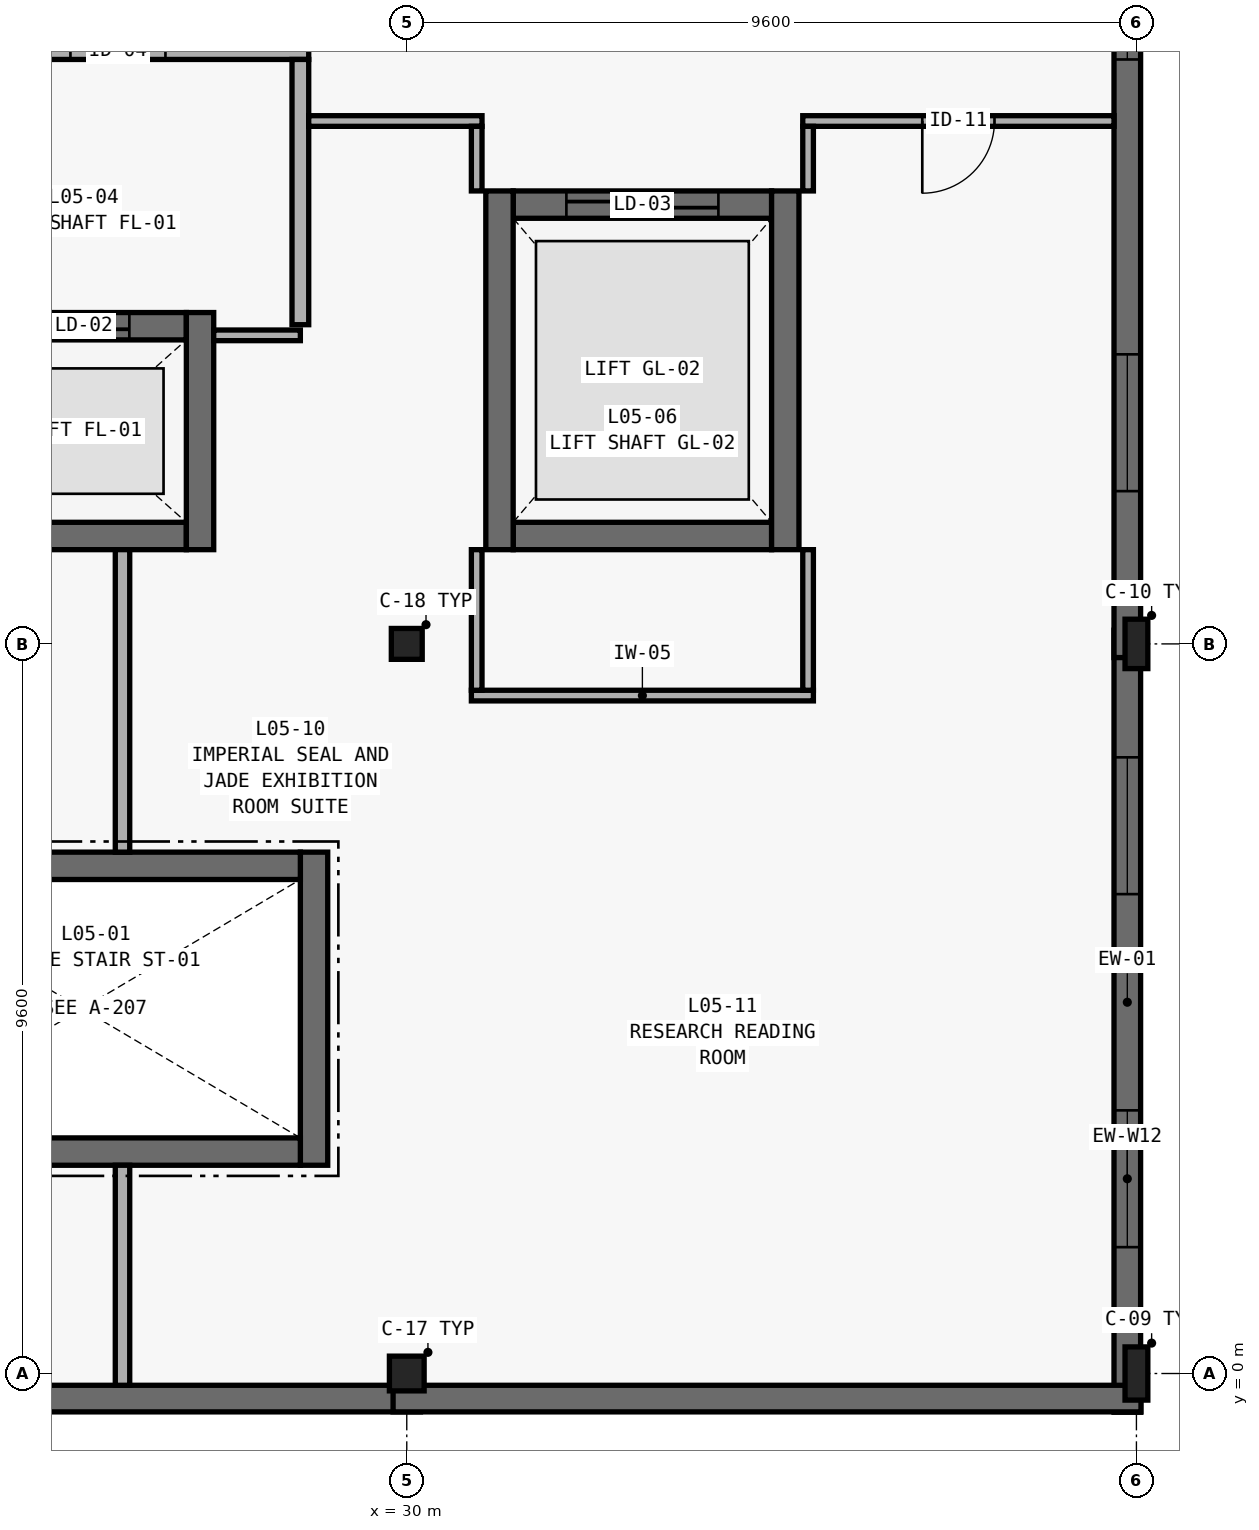
"""IFC4 building model, lengths in metres.
Left out: names, types, materials, properties, quantities, classifications, styles, units other than length and angle.
Written with IfcOpenShell. Run it as: python <this file> out.ifc"""

import sys

from ifc_helpers import new_model, si_unit, direction, frame, frame_2d, origin, origin_2d, place, context, subcontext, project, spatial, rectangle, hollow_circle, i_section, extrude, element, fill, save


model = new_model("IFC4")
c1 = context("Model", 3, precision=1e-05, world=origin(), true_north=direction((0.0, 1.0)))
c2 = subcontext(c1, "Body", "Model", "MODEL_VIEW")
j1 = project(units=[si_unit("LENGTHUNIT", "METRE"), si_unit("PLANEANGLEUNIT", "RADIAN")], contexts=[c1])
p1 = place(None, origin())
s1 = spatial("IfcSite", under=j1, at=p1, CompositionType="ELEMENT")
p2 = place(p1, origin())
s2 = spatial("IfcBuilding", under=s1, at=p2, CompositionType="ELEMENT")
p3 = place(p2, frame((0.0, 0.0, 25.5)))
s3 = spatial("IfcBuildingStorey", under=s2, at=p3, CompositionType="ELEMENT", Elevation=25.5)
p4 = place(p3, frame((30.0, 0.0, 0.0), z_axis=(0.0, 0.0, 1.0), x_axis=(1.0, 0.0, 0.0)))
e1 = element("IfcColumn", 1, at=p4, inside=s3, PredefinedType="COLUMN", context=c2, shape_type="SweptSolid", body=[
    extrude(hollow_circle(Radius=0.229, WallThickness=0.02, at=origin_2d()), origin(), (0.0, 0.0, 1.0), 4.2),
])
p5 = place(p3, frame((30.0, 9.6, 0.0), z_axis=(0.0, 0.0, 1.0), x_axis=(1.0, 0.0, 0.0)))
e2 = element("IfcColumn", 2, at=p5, inside=s3, PredefinedType="COLUMN", context=c2, shape_type="SweptSolid", body=[
    extrude(hollow_circle(Radius=0.203, WallThickness=0.02, at=origin_2d()), origin(), (0.0, 0.0, 1.0), 4.2),
])
p6 = place(p3, frame((39.6, 0.0, 0.0), z_axis=(0.0, 0.0, 1.0), x_axis=(1.0, 0.0, 0.0)))
e3 = element("IfcColumn", 3, at=p6, inside=s3, PredefinedType="COLUMN", context=c2, shape_type="SweptSolid", body=[
    extrude(i_section(OverallWidth=0.3, OverallDepth=0.7, WebThickness=0.017, FlangeThickness=0.032, FilletRadius=0.027, at=origin_2d()), origin(), (0.0, 0.0, 1.0), 4.2),
])
p7 = place(p3, frame((39.6, 9.6, 0.0), z_axis=(0.0, 0.0, 1.0), x_axis=(1.0, 0.0, 0.0)))
e4 = element("IfcColumn", 4, at=p7, inside=s3, PredefinedType="COLUMN", context=c2, shape_type="SweptSolid", body=[
    extrude(i_section(OverallWidth=0.3, OverallDepth=0.65, WebThickness=0.016, FlangeThickness=0.031, FilletRadius=0.027, at=origin_2d()), origin(), (0.0, 0.0, 1.0), 4.2),
])
p8 = place(p3, frame((39.48, -0.51, 0.0), z_axis=(0.0, 0.0, 1.0), x_axis=(0.0, 1.0, 0.0)))
e5 = element("IfcWall", 5, at=p8, inside=s3, PredefinedType="STANDARD", context=c2, shape_type="SweptSolid", body=[
    extrude(rectangle(XDim=10.29, YDim=0.35, at=frame_2d((5.145, 0.0))), origin(), (0.0, 0.0, 1.0), 3.9),
])
p9 = place(p8, frame((2.173, 0.0, 1.8)))
e6 = element("IfcOpeningElement", 6, at=p9, cuts=e5, PredefinedType="OPENING", context=c2, shape_type="SweptSolid", body=[
    extrude(rectangle(XDim=1.8, YDim=1.1, at=frame_2d((0.9, 0.55))), frame((0.0, 0.19, 0.0), z_axis=(0.0, -1.0, 0.0), x_axis=(1.0, 0.0, 0.0)), (0.0, 0.0, 1.0), 0.38),
])
p10 = place(p8, frame((6.817, 0.0, 1.8)))
e7 = element("IfcOpeningElement", 7, at=p10, cuts=e5, PredefinedType="OPENING", context=c2, shape_type="SweptSolid", body=[
    extrude(rectangle(XDim=1.8, YDim=1.1, at=frame_2d((0.9, 0.55))), frame((0.0, 0.19, 0.0), z_axis=(0.0, -1.0, 0.0), x_axis=(1.0, 0.0, 0.0)), (0.0, 0.0, 1.0), 0.38),
])
p11 = place(p3, frame((39.48, 9.42, 0.0), z_axis=(0.0, 0.0, 1.0), x_axis=(0.0, 1.0, 0.0)))
e8 = element("IfcWall", 8, at=p11, inside=s3, PredefinedType="STANDARD", context=c2, shape_type="SweptSolid", body=[
    extrude(rectangle(XDim=12.36, YDim=0.35, at=frame_2d((6.18, 0.0))), origin(), (0.0, 0.0, 1.0), 3.9),
])
p12 = place(p11, frame((2.19, 0.0, 1.8)))
e9 = element("IfcOpeningElement", 9, at=p12, cuts=e8, PredefinedType="OPENING", context=c2, shape_type="SweptSolid", body=[
    extrude(rectangle(XDim=1.8, YDim=1.1, at=frame_2d((0.9, 0.55))), frame((0.0, 0.19, 0.0), z_axis=(0.0, -1.0, 0.0), x_axis=(1.0, 0.0, 0.0)), (0.0, 0.0, 1.0), 0.38),
])
p13 = place(p11, frame((7.87, 0.0, 1.8)))
e10 = element("IfcOpeningElement", 10, at=p13, cuts=e8, PredefinedType="OPENING", context=c2, shape_type="SweptSolid", body=[
    extrude(rectangle(XDim=1.8, YDim=1.1, at=frame_2d((0.9, 0.55))), frame((0.0, 0.19, 0.0), z_axis=(0.0, -1.0, 0.0), x_axis=(1.0, 0.0, 0.0)), (0.0, 0.0, 1.0), 0.38),
])
p14 = place(p3, frame((20.22, -0.33, 0.0), z_axis=(0.0, 0.0, 1.0), x_axis=(1.0, 0.0, 0.0)))
e11 = element("IfcWall", 11, at=p14, inside=s3, PredefinedType="STANDARD", context=c2, shape_type="SweptSolid", body=[
    extrude(rectangle(XDim=9.96, YDim=0.35, at=frame_2d((4.98, 0.0))), origin(), (0.0, 0.0, 1.0), 3.9),
])
p15 = place(p3, frame((29.82, -0.33, 0.0), z_axis=(0.0, 0.0, 1.0), x_axis=(1.0, 0.0, 0.0)))
e12 = element("IfcWall", 12, at=p15, inside=s3, PredefinedType="STANDARD", context=c2, shape_type="SweptSolid", body=[
    extrude(rectangle(XDim=9.84, YDim=0.35, at=frame_2d((4.92, 0.0))), origin(), (0.0, 0.0, 1.0), 3.9),
])
p16 = place(p3, frame((28.78, 2.74, 0.0), z_axis=(0.0, 0.0, 1.0), x_axis=(0.0, 1.0, 0.0)))
e13 = element("IfcWall", 13, at=p16, inside=s3, PredefinedType="SHEAR", context=c2, shape_type="SweptSolid", body=[
    extrude(rectangle(XDim=4.12, YDim=0.36, at=frame_2d((2.06, 0.0))), origin(), (0.0, 0.0, 1.0), 3.96),
])
for number, where, z_axis, x_axis in (
    (14, (21.2, 6.68, 0.0), (0.0, 0.0, 1.0), (1.0, 0.0, 0.0)),
    (15, (21.2, 2.92, 0.0), (0.0, 0.0, 1.0), (1.0, 0.0, 0.0)),
):
    element("IfcWall", number, at=place(p3, frame(where, z_axis=z_axis, x_axis=x_axis)), inside=s3, PredefinedType="SHEAR", context=c2, shape_type="SweptSolid", body=[
        extrude(rectangle(XDim=7.4, YDim=0.36, at=frame_2d((3.7, 0.0))), origin(), (0.0, 0.0, 1.0), 3.96),
    ])
p17 = place(p3, frame((24.4, 13.78, 0.0), z_axis=(0.0, 0.0, 1.0), x_axis=(1.0, 0.0, 0.0)))
e16 = element("IfcWall", 16, at=p17, inside=s3, PredefinedType="SHEAR", context=c2, shape_type="SweptSolid", body=[
    extrude(rectangle(XDim=2.7, YDim=0.36, at=frame_2d((1.35, 0.0))), origin(), (0.0, 0.0, 1.0), 3.96),
])
p18 = place(p17, frame((0.75, 0.0, 0.0)))
e17 = element("IfcOpeningElement", 17, at=p18, cuts=e16, PredefinedType="OPENING", context=c2, shape_type="SweptSolid", body=[
    extrude(rectangle(XDim=1.2, YDim=2.15, at=frame_2d((0.6, 1.075))), frame((0.0, 0.195, 0.0), z_axis=(0.0, -1.0, 0.0), x_axis=(1.0, 0.0, 0.0)), (0.0, 0.0, 1.0), 0.39),
])
p19 = place(p3, frame((24.4, 11.02, 0.0), z_axis=(0.0, 0.0, 1.0), x_axis=(1.0, 0.0, 0.0)))
e18 = element("IfcWall", 18, at=p19, inside=s3, PredefinedType="SHEAR", context=c2, shape_type="SweptSolid", body=[
    extrude(rectangle(XDim=2.7, YDim=0.36, at=frame_2d((1.35, 0.0))), origin(), (0.0, 0.0, 1.0), 3.96),
])
p20 = place(p3, frame((27.28, 10.84, 0.0), z_axis=(0.0, 0.0, 1.0), x_axis=(0.0, 1.0, 0.0)))
e19 = element("IfcWall", 19, at=p20, inside=s3, PredefinedType="SHEAR", context=c2, shape_type="SweptSolid", body=[
    extrude(rectangle(XDim=3.12, YDim=0.36, at=frame_2d((1.56, 0.0))), origin(), (0.0, 0.0, 1.0), 3.96),
])
p21 = place(p3, frame((23.69, 17.4, 0.0), z_axis=(0.0, 0.0, 1.0), x_axis=(1.0, 0.0, 0.0)))
e20 = element("IfcWall", 20, at=p21, inside=s3, PredefinedType="PARTITIONING", context=c2, shape_type="SweptSolid", body=[
    extrude(rectangle(XDim=5.02, YDim=0.22, at=frame_2d((2.51, 0.0))), origin(), (0.0, 0.0, 1.0), 2.84),
])
p22 = place(p21, frame((1.885, 0.0, 0.0)))
e21 = element("IfcOpeningElement", 21, at=p22, cuts=e20, PredefinedType="OPENING", context=c2, shape_type="SweptSolid", body=[
    extrude(rectangle(XDim=1.25, YDim=2.15, at=frame_2d((0.625, 1.075))), frame((0.0, 0.125, 0.0), z_axis=(0.0, -1.0, 0.0), x_axis=(1.0, 0.0, 0.0)), (0.0, 0.0, 1.0), 0.25),
])
p23 = place(p3, frame((28.6, 13.8, 0.0), z_axis=(0.0, 0.0, 1.0), x_axis=(0.0, 1.0, 0.0)))
e22 = element("IfcWall", 22, at=p23, inside=s3, PredefinedType="PARTITIONING", context=c2, shape_type="SweptSolid", body=[
    extrude(rectangle(XDim=3.49, YDim=0.22, at=frame_2d((1.745, 0.0))), origin(), (0.0, 0.0, 1.0), 2.84),
])
p24 = place(p3, frame((31.4, 15.38, 0.0), z_axis=(0.0, 0.0, 1.0), x_axis=(1.0, 0.0, 0.0)))
e23 = element("IfcWall", 23, at=p24, inside=s3, PredefinedType="SHEAR", context=c2, shape_type="SweptSolid", body=[
    extrude(rectangle(XDim=3.4, YDim=0.36, at=frame_2d((1.7, 0.0))), origin(), (0.0, 0.0, 1.0), 3.96),
])
p25 = place(p24, frame((0.7, 0.0, 0.0)))
e24 = element("IfcOpeningElement", 24, at=p25, cuts=e23, PredefinedType="OPENING", context=c2, shape_type="SweptSolid", body=[
    extrude(rectangle(XDim=2.0, YDim=2.4, at=frame_2d((1.0, 1.2))), frame((0.0, 0.195, 0.0), z_axis=(0.0, -1.0, 0.0), x_axis=(1.0, 0.0, 0.0)), (0.0, 0.0, 1.0), 0.39),
])
p26 = place(p3, frame((31.4, 11.02, 0.0), z_axis=(0.0, 0.0, 1.0), x_axis=(1.0, 0.0, 0.0)))
e25 = element("IfcWall", 25, at=p26, inside=s3, PredefinedType="SHEAR", context=c2, shape_type="SweptSolid", body=[
    extrude(rectangle(XDim=3.4, YDim=0.36, at=frame_2d((1.7, 0.0))), origin(), (0.0, 0.0, 1.0), 3.96),
])
for number, where, z_axis, x_axis in (
    (26, (31.22, 10.84, 0.0), (0.0, 0.0, 1.0), (0.0, 1.0, 0.0)),
    (27, (34.98, 10.84, 0.0), (0.0, 0.0, 1.0), (0.0, 1.0, 0.0)),
):
    element("IfcWall", number, at=place(p3, frame(where, z_axis=z_axis, x_axis=x_axis)), inside=s3, PredefinedType="SHEAR", context=c2, shape_type="SweptSolid", body=[
        extrude(rectangle(XDim=4.72, YDim=0.36, at=frame_2d((2.36, 0.0))), origin(), (0.0, 0.0, 1.0), 3.96),
    ])
p27 = place(p3, frame((30.85, 8.92, 0.0), z_axis=(0.0, 0.0, 1.0), x_axis=(1.0, 0.0, 0.0)))
e28 = element("IfcWall", 28, at=p27, inside=s3, PredefinedType="PARTITIONING", context=c2, shape_type="SweptSolid", body=[
    extrude(rectangle(XDim=4.5, YDim=0.14, at=frame_2d((2.25, 0.0))), origin(), (0.0, 0.0, 1.0), 2.84),
])
p28 = place(p3, frame((27.46, 13.66, 0.0), z_axis=(0.0, 0.0, 1.0), x_axis=(1.0, 0.0, 0.0)))
e29 = element("IfcWall", 29, at=p28, inside=s3, PredefinedType="PARTITIONING", context=c2, shape_type="SweptSolid", body=[
    extrude(rectangle(XDim=1.14, YDim=0.14, at=frame_2d((0.57, 0.0))), origin(), (0.0, 0.0, 1.0), 2.84),
])
p29 = place(p3, frame((28.71, 16.48, 0.0), z_axis=(0.0, 0.0, 1.0), x_axis=(1.0, 0.0, 0.0)))
e30 = element("IfcWall", 30, at=p29, inside=s3, PredefinedType="PARTITIONING", context=c2, shape_type="SweptSolid", body=[
    extrude(rectangle(XDim=2.28, YDim=0.14, at=frame_2d((1.14, 0.0))), origin(), (0.0, 0.0, 1.0), 2.84),
])
p30 = place(p3, frame((35.21, 16.48, 0.0), z_axis=(0.0, 0.0, 1.0), x_axis=(1.0, 0.0, 0.0)))
e31 = element("IfcWall", 31, at=p30, inside=s3, PredefinedType="PARTITIONING", context=c2, shape_type="SweptSolid", body=[
    extrude(rectangle(XDim=4.095, YDim=0.14, at=frame_2d((2.047, 0.0))), origin(), (0.0, 0.0, 1.0), 2.84),
])
p31 = place(p30, frame((1.573, 0.0, 0.0)))
e32 = element("IfcOpeningElement", 32, at=p31, cuts=e31, PredefinedType="OPENING", context=c2, shape_type="SweptSolid", body=[
    extrude(rectangle(XDim=0.95, YDim=2.15, at=frame_2d((0.475, 1.075))), frame((0.0, 0.085, 0.0), z_axis=(0.0, -1.0, 0.0), x_axis=(1.0, 0.0, 0.0)), (0.0, 0.0, 1.0), 0.17),
])
p32 = place(p3, frame((26.26, -0.155, 0.0), z_axis=(0.0, 0.0, 1.0), x_axis=(0.0, 1.0, 0.0)))
e33 = element("IfcWall", 33, at=p32, inside=s3, PredefinedType="PARTITIONING", context=c2, shape_type="SweptSolid", body=[
    extrude(rectangle(XDim=2.895, YDim=0.19, at=frame_2d((1.448, 0.0))), origin(), (0.0, 0.0, 1.0), 2.84),
])
p33 = place(p3, frame((26.26, 6.86, 0.0), z_axis=(0.0, 0.0, 1.0), x_axis=(0.0, 1.0, 0.0)))
e34 = element("IfcWall", 34, at=p33, inside=s3, PredefinedType="PARTITIONING", context=c2, shape_type="SweptSolid", body=[
    extrude(rectangle(XDim=3.98, YDim=0.19, at=frame_2d((1.99, 0.0))), origin(), (0.0, 0.0, 1.0), 2.84),
])
p34 = place(p3, frame((30.92, 8.99, 0.0), z_axis=(0.0, 0.0, 1.0), x_axis=(0.0, 1.0, 0.0)))
e35 = element("IfcWall", 35, at=p34, inside=s3, PredefinedType="PARTITIONING", context=c2, shape_type="SweptSolid", body=[
    extrude(rectangle(XDim=1.85, YDim=0.14, at=frame_2d((0.925, 0.0))), origin(), (0.0, 0.0, 1.0), 2.84),
])
p35 = place(p3, frame((30.92, 15.56, 0.0), z_axis=(0.0, 0.0, 1.0), x_axis=(0.0, 1.0, 0.0)))
e36 = element("IfcWall", 36, at=p35, inside=s3, PredefinedType="PARTITIONING", context=c2, shape_type="SweptSolid", body=[
    extrude(rectangle(XDim=0.85, YDim=0.14, at=frame_2d((0.425, 0.0))), origin(), (0.0, 0.0, 1.0), 2.84),
])
p36 = place(p3, frame((35.28, 8.99, 0.0), z_axis=(0.0, 0.0, 1.0), x_axis=(0.0, 1.0, 0.0)))
e37 = element("IfcWall", 37, at=p36, inside=s3, PredefinedType="PARTITIONING", context=c2, shape_type="SweptSolid", body=[
    extrude(rectangle(XDim=1.85, YDim=0.14, at=frame_2d((0.925, 0.0))), origin(), (0.0, 0.0, 1.0), 2.84),
])
p37 = place(p3, frame((35.28, 15.56, 0.0), z_axis=(0.0, 0.0, 1.0), x_axis=(0.0, 1.0, 0.0)))
e38 = element("IfcWall", 38, at=p37, inside=s3, PredefinedType="PARTITIONING", context=c2, shape_type="SweptSolid", body=[
    extrude(rectangle(XDim=0.85, YDim=0.14, at=frame_2d((0.425, 0.0))), origin(), (0.0, 0.0, 1.0), 2.84),
])
p38 = place(p9, origin())
e39 = element("IfcWindow", 39, at=p38, inside=s3, PartitioningType="SINGLE_PANEL", PredefinedType="WINDOW", context=c2, shape_type="SweptSolid", body=[
    extrude(rectangle(XDim=1.8, YDim=1.1, at=frame_2d((0.9, 0.55))), frame((0.0, 0.03, 0.0), z_axis=(0.0, -1.0, 0.0), x_axis=(1.0, 0.0, 0.0)), (0.0, 0.0, 1.0), 0.06),
])
fill(e6, e39)
p39 = place(p10, origin())
e40 = element("IfcWindow", 40, at=p39, inside=s3, PartitioningType="SINGLE_PANEL", PredefinedType="WINDOW", context=c2, shape_type="SweptSolid", body=[
    extrude(rectangle(XDim=1.8, YDim=1.1, at=frame_2d((0.9, 0.55))), frame((0.0, 0.03, 0.0), z_axis=(0.0, -1.0, 0.0), x_axis=(1.0, 0.0, 0.0)), (0.0, 0.0, 1.0), 0.06),
])
fill(e7, e40)
p40 = place(p12, origin())
e41 = element("IfcWindow", 41, at=p40, inside=s3, PartitioningType="SINGLE_PANEL", PredefinedType="WINDOW", context=c2, shape_type="SweptSolid", body=[
    extrude(rectangle(XDim=1.8, YDim=1.1, at=frame_2d((0.9, 0.55))), frame((0.0, 0.03, 0.0), z_axis=(0.0, -1.0, 0.0), x_axis=(1.0, 0.0, 0.0)), (0.0, 0.0, 1.0), 0.06),
])
fill(e9, e41)
p41 = place(p13, origin())
e42 = element("IfcWindow", 42, at=p41, inside=s3, PartitioningType="SINGLE_PANEL", PredefinedType="WINDOW", context=c2, shape_type="SweptSolid", body=[
    extrude(rectangle(XDim=1.8, YDim=1.1, at=frame_2d((0.9, 0.55))), frame((0.0, 0.03, 0.0), z_axis=(0.0, -1.0, 0.0), x_axis=(1.0, 0.0, 0.0)), (0.0, 0.0, 1.0), 0.06),
])
fill(e10, e42)
p42 = place(p18, origin())
e43 = element("IfcDoor", 43, at=p42, inside=s3, OperationType="DOUBLE_DOOR_SLIDING", PredefinedType="DOOR", context=c2, shape_type="SweptSolid", body=[
    extrude(rectangle(XDim=1.2, YDim=2.15, at=frame_2d((0.6, 1.075))), frame((0.0, 0.025, 0.0), z_axis=(0.0, -1.0, 0.0), x_axis=(1.0, 0.0, 0.0)), (0.0, 0.0, 1.0), 0.05),
])
fill(e17, e43)
p43 = place(p22, origin())
e44 = element("IfcDoor", 44, at=p43, inside=s3, OperationType="SINGLE_SWING_RIGHT", PredefinedType="DOOR", context=c2, shape_type="SweptSolid", body=[
    extrude(rectangle(XDim=1.25, YDim=2.15, at=frame_2d((0.625, 1.075))), frame((0.0, 0.025, 0.0), z_axis=(0.0, -1.0, 0.0), x_axis=(1.0, 0.0, 0.0)), (0.0, 0.0, 1.0), 0.05),
])
fill(e21, e44)
p44 = place(p25, origin())
e45 = element("IfcDoor", 45, at=p44, inside=s3, OperationType="DOUBLE_DOOR_SLIDING", PredefinedType="DOOR", context=c2, shape_type="SweptSolid", body=[
    extrude(rectangle(XDim=2.0, YDim=2.4, at=frame_2d((1.0, 1.2))), frame((0.0, 0.025, 0.0), z_axis=(0.0, -1.0, 0.0), x_axis=(1.0, 0.0, 0.0)), (0.0, 0.0, 1.0), 0.05),
])
fill(e24, e45)
p45 = place(p31, frame((0.95, 0.0, 0.0), z_axis=(0.0, 0.0, 1.0), x_axis=(-1.0, 0.0, 0.0)))
e46 = element("IfcDoor", 46, at=p45, inside=s3, OperationType="SINGLE_SWING_LEFT", PredefinedType="DOOR", context=c2, shape_type="SweptSolid", body=[
    extrude(rectangle(XDim=0.95, YDim=2.15, at=frame_2d((0.475, 1.075))), frame((0.0, 0.025, 0.0), z_axis=(0.0, -1.0, 0.0), x_axis=(1.0, 0.0, 0.0)), (0.0, 0.0, 1.0), 0.05),
])
fill(e32, e46)
save(model, sys.argv[1])
